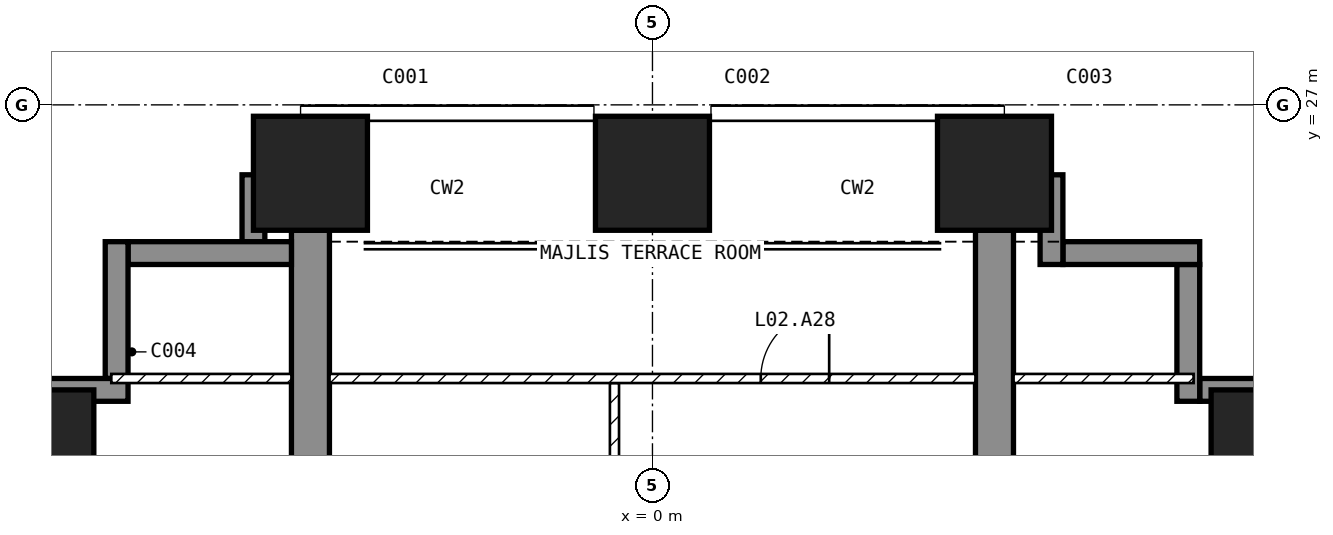
"""IFC4 building model, lengths in metres.
Left out: names, types, materials, properties, quantities, classifications, styles, units other than length and angle.
Written with IfcOpenShell. Run it as: python <this file> out.ifc"""

import sys

from ifc_helpers import new_model, si_unit, direction, frame, frame_2d, origin, origin_2d, place, context, subcontext, project, spatial, polyline, rectangle, outline, extrude, element, fill, save


model = new_model("IFC4")
c1 = context("Model", 3, precision=1e-05, world=origin(), true_north=direction((0.0, 1.0)))
c2 = subcontext(c1, "Body", "Model", "MODEL_VIEW")
j1 = project(units=[si_unit("LENGTHUNIT", "METRE"), si_unit("PLANEANGLEUNIT", "RADIAN")], contexts=[c1])
p1 = place(None, origin())
s1 = spatial("IfcSite", under=j1, at=p1, CompositionType="ELEMENT")
p2 = place(p1, origin())
s2 = spatial("IfcBuilding", under=s1, at=p2, CompositionType="ELEMENT")
p3 = place(p2, frame((0.0, 0.0, 21.0)))
s3 = spatial("IfcBuildingStorey", under=s2, at=p3, CompositionType="ELEMENT", Elevation=21.0)
p4 = place(p3, frame((-8.1, 22.5, -1.4), z_axis=(0.0, 0.0, 1.0), x_axis=(1.0, 0.0, 0.0)))
e1 = element("IfcColumn", 1, at=p4, inside=s3, PredefinedType="COLUMN", context=c2, shape_type="SweptSolid", body=[
    extrude(rectangle(XDim=1.5, YDim=1.5, at=origin_2d()), origin(), (0.0, 0.0, 1.0), 6.95),
])
for number, where, z_axis, x_axis in (
    (2, (-4.5, 26.1, -0.3), (0.0, 0.0, 1.0), (1.0, 0.0, 0.0)),
    (3, (0.0, 26.1, -0.3), (0.0, 0.0, 1.0), (1.0, 0.0, 0.0)),
    (4, (4.5, 26.1, -0.3), (0.0, 0.0, 1.0), (1.0, 0.0, 0.0)),
):
    element("IfcColumn", number, at=place(p3, frame(where, z_axis=z_axis, x_axis=x_axis)), inside=s3, PredefinedType="COLUMN", context=c2, shape_type="SweptSolid", body=[
        extrude(rectangle(XDim=1.5, YDim=1.5, at=origin_2d()), origin(), (0.0, 0.0, 1.0), 5.85),
    ])
p5 = place(p3, frame((8.1, 22.5, -1.4), z_axis=(0.0, 0.0, 1.0), x_axis=(1.0, 0.0, 0.0)))
e5 = element("IfcColumn", 5, at=p5, inside=s3, PredefinedType="COLUMN", context=c2, shape_type="SweptSolid", body=[
    extrude(rectangle(XDim=1.5, YDim=1.5, at=origin_2d()), origin(), (0.0, 0.0, 1.0), 6.95),
])
for number, where, z_axis, x_axis in (
    (6, (-4.75, 9.0, -0.3), (1.0, 0.0, 0.0), (0.0, 1.0, 0.0)),
    (7, (4.25, 9.0, -0.3), (1.0, 0.0, 0.0), (0.0, 1.0, 0.0)),
):
    element("IfcWall", number, at=place(p3, frame(where, z_axis=z_axis, x_axis=x_axis)), inside=s3, PredefinedType="SHEAR", context=c2, shape_type="SweptSolid", body=[
        extrude(outline(polyline([(0.0, 0.0), (2.1, 0.0), (2.1, 2.7), (4.5, 2.7), (4.5, 0.0), (9.9, 0.0), (9.9, 2.7), (12.3, 2.7), (12.3, 0.0), (16.35, 0.0), (16.35, 5.85), (0.0, 5.85), (0.0, 0.0)])), origin(), (0.0, 0.0, 1.0), 0.5),
    ])
p6 = place(p3, frame((8.08, 23.25, 0.0), z_axis=(0.0, 0.0, 1.0), x_axis=(-1.0, 0.0, 0.0)))
e8 = element("IfcWall", 8, at=p6, inside=s3, PredefinedType="SOLIDWALL", context=c2, shape_type="SweptSolid", body=[
    extrude(rectangle(XDim=0.88, YDim=0.3, at=frame_2d((0.44, 0.0))), origin(), (0.0, 0.0, 1.0), 5.55),
])
p7 = place(p3, frame((7.05, 23.1, 0.0), z_axis=(0.0, 0.0, 1.0), x_axis=(0.0, 1.0, 0.0)))
e9 = element("IfcWall", 9, at=p7, inside=s3, PredefinedType="SOLIDWALL", context=c2, shape_type="SweptSolid", body=[
    extrude(rectangle(XDim=1.8, YDim=0.3, at=frame_2d((0.9, 0.0))), origin(), (0.0, 0.0, 1.0), 5.55),
])
p8 = place(p3, frame((7.2, 25.05, 0.0), z_axis=(0.0, 0.0, 1.0), x_axis=(-1.0, 0.0, 0.0)))
e10 = element("IfcWall", 10, at=p8, inside=s3, PredefinedType="SOLIDWALL", context=c2, shape_type="SweptSolid", body=[
    extrude(rectangle(XDim=1.8, YDim=0.3, at=frame_2d((0.9, 0.0))), origin(), (0.0, 0.0, 1.0), 5.55),
])
p9 = place(p3, frame((5.25, 24.9, 0.0), z_axis=(0.0, 0.0, 1.0), x_axis=(0.0, 1.0, 0.0)))
e11 = element("IfcWall", 11, at=p9, inside=s3, PredefinedType="SOLIDWALL", context=c2, shape_type="SweptSolid", body=[
    extrude(rectangle(XDim=1.18, YDim=0.3, at=frame_2d((0.59, 0.0))), origin(), (0.0, 0.0, 1.0), 5.55),
])
p10 = place(p3, frame((-5.25, 26.08, 0.0), z_axis=(0.0, 0.0, 1.0), x_axis=(0.0, -1.0, 0.0)))
e12 = element("IfcWall", 12, at=p10, inside=s3, PredefinedType="SOLIDWALL", context=c2, shape_type="SweptSolid", body=[
    extrude(rectangle(XDim=0.88, YDim=0.3, at=frame_2d((0.44, 0.0))), origin(), (0.0, 0.0, 1.0), 5.55),
])
p11 = place(p3, frame((-4.75, 25.05, 0.0), z_axis=(0.0, 0.0, 1.0), x_axis=(-1.0, 0.0, 0.0)))
e13 = element("IfcWall", 13, at=p11, inside=s3, PredefinedType="SOLIDWALL", context=c2, shape_type="SweptSolid", body=[
    extrude(rectangle(XDim=2.15, YDim=0.3, at=frame_2d((1.075, 0.0))), origin(), (0.0, 0.0, 1.0), 5.55),
])
p12 = place(p3, frame((-7.05, 25.2, 0.0), z_axis=(0.0, 0.0, 1.0), x_axis=(0.0, -1.0, 0.0)))
e14 = element("IfcWall", 14, at=p12, inside=s3, PredefinedType="SOLIDWALL", context=c2, shape_type="SweptSolid", body=[
    extrude(rectangle(XDim=1.8, YDim=0.3, at=frame_2d((0.9, 0.0))), origin(), (0.0, 0.0, 1.0), 5.55),
])
p13 = place(p3, frame((-6.9, 23.25, 0.0), z_axis=(0.0, 0.0, 1.0), x_axis=(-1.0, 0.0, 0.0)))
e15 = element("IfcWall", 15, at=p13, inside=s3, PredefinedType="SOLIDWALL", context=c2, shape_type="SweptSolid", body=[
    extrude(rectangle(XDim=1.18, YDim=0.3, at=frame_2d((0.59, 0.0))), origin(), (0.0, 0.0, 1.0), 5.55),
])
p14 = place(p3, frame((-0.5, 18.96, 0.0), z_axis=(0.0, 0.0, 1.0), x_axis=(0.0, 1.0, 0.0)))
e16 = element("IfcWall", 16, at=p14, inside=s3, PredefinedType="PARTITIONING", context=c2, shape_type="SweptSolid", body=[
    extrude(rectangle(XDim=4.38, YDim=0.12, at=frame_2d((2.19, 0.0))), origin(), (0.0, 0.0, 1.0), 5.55),
])
p15 = place(p14, frame((1.74, 0.0, 0.0)))
e17 = element("IfcOpeningElement", 17, at=p15, cuts=e16, PredefinedType="OPENING", context=c2, shape_type="SweptSolid", body=[
    extrude(rectangle(XDim=0.9, YDim=2.1, at=frame_2d((0.45, 1.05))), frame((0.0, 0.07, 0.0), z_axis=(0.0, -1.0, 0.0), x_axis=(1.0, 0.0, 0.0)), (0.0, 0.0, 1.0), 0.14),
])
p16 = place(p3, frame((-4.25, 23.4, 0.0), z_axis=(0.0, 0.0, 1.0), x_axis=(1.0, 0.0, 0.0)))
e18 = element("IfcWall", 18, at=p16, inside=s3, PredefinedType="PARTITIONING", context=c2, shape_type="SweptSolid", body=[
    extrude(rectangle(XDim=8.5, YDim=0.12, at=frame_2d((4.25, 0.0))), origin(), (0.0, 0.0, 1.0), 5.55),
])
p17 = place(p16, frame((5.675, 0.0, 0.0)))
e19 = element("IfcOpeningElement", 19, at=p17, cuts=e18, PredefinedType="OPENING", context=c2, shape_type="SweptSolid", body=[
    extrude(rectangle(XDim=0.9, YDim=2.1, at=frame_2d((0.45, 1.05))), frame((0.0, 0.07, 0.0), z_axis=(0.0, -1.0, 0.0), x_axis=(1.0, 0.0, 0.0)), (0.0, 0.0, 1.0), 0.14),
])
for number, where, z_axis, x_axis in (
    (20, (4.75, 23.4, 0.0), (0.0, 0.0, 1.0), (1.0, 0.0, 0.0)),
    (21, (-7.12, 23.4, 0.0), (0.0, 0.0, 1.0), (1.0, 0.0, 0.0)),
):
    element("IfcWall", number, at=place(p3, frame(where, z_axis=z_axis, x_axis=x_axis)), inside=s3, PredefinedType="PARTITIONING", context=c2, shape_type="SweptSolid", body=[
        extrude(rectangle(XDim=2.37, YDim=0.12, at=frame_2d((1.185, 0.0))), origin(), (0.0, 0.0, 1.0), 5.55),
    ])
p18 = place(p17, origin())
e22 = element("IfcDoor", 22, at=p18, inside=s3, OperationType="SINGLE_SWING_RIGHT", PredefinedType="DOOR", context=c2, shape_type="SweptSolid", body=[
    extrude(rectangle(XDim=0.9, YDim=2.1, at=frame_2d((0.45, 1.05))), frame((0.0, 0.025, 0.0), z_axis=(0.0, -1.0, 0.0), x_axis=(1.0, 0.0, 0.0)), (0.0, 0.0, 1.0), 0.05),
])
fill(e19, e22)
save(model, sys.argv[1])
